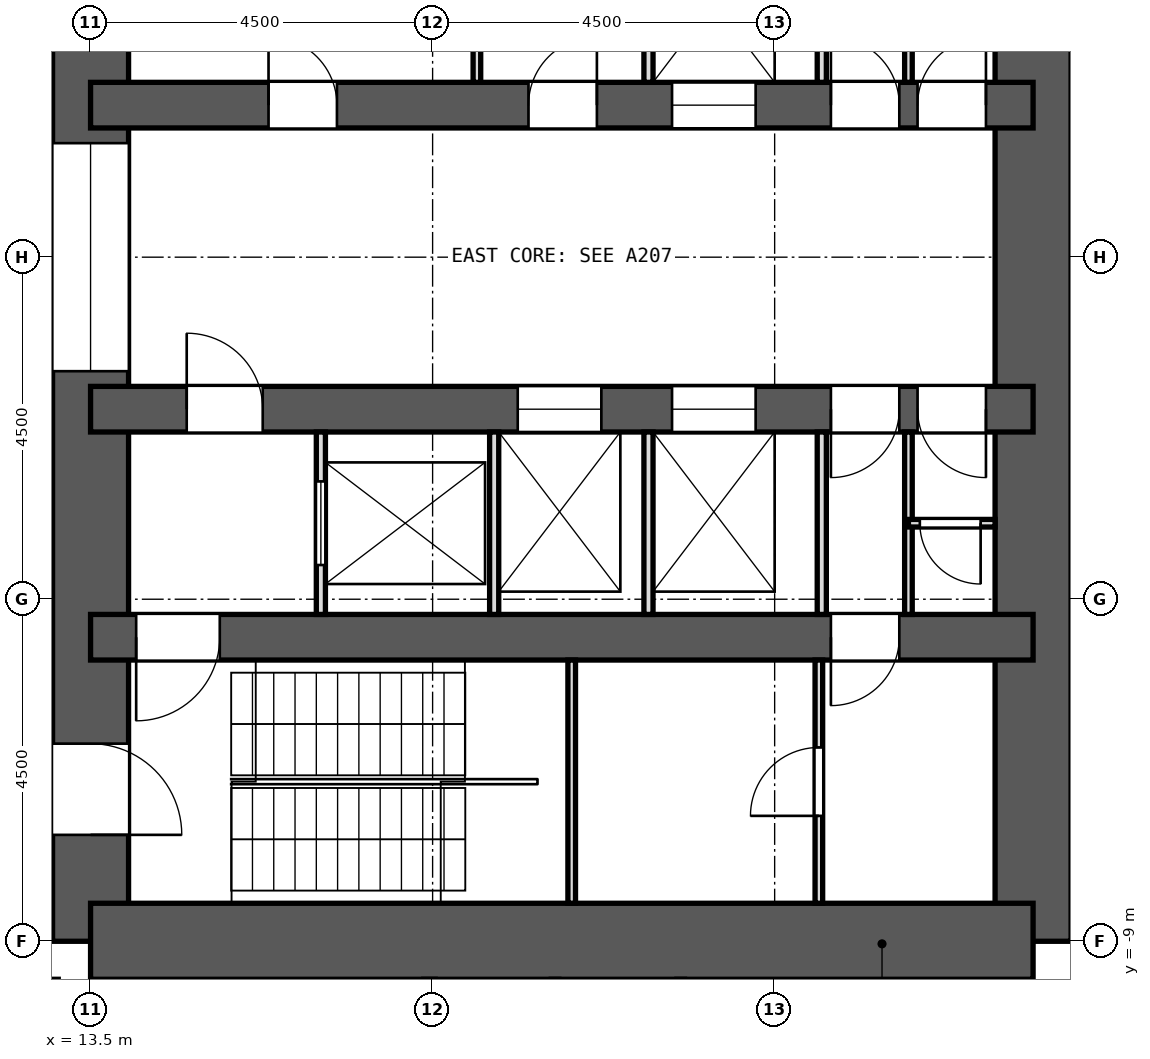
"""IFC4 building model, lengths in metres.
Left out: names, types, materials, properties, quantities, classifications, styles, units other than length and angle.
Written with IfcOpenShell. Run it as: python <this file> out.ifc"""

import sys

from ifc_helpers import new_model, si_unit, direction, frame, frame_2d, origin, place, context, subcontext, project, spatial, rectangle, extrude, element, fill, save


model = new_model("IFC4")
c1 = context("Model", 3, precision=1e-05, world=origin(), true_north=direction((0.0, 1.0)))
c2 = subcontext(c1, "Body", "Model", "MODEL_VIEW")
j1 = project(units=[si_unit("LENGTHUNIT", "METRE"), si_unit("PLANEANGLEUNIT", "RADIAN")], contexts=[c1])
p1 = place(None, origin())
s1 = spatial("IfcSite", under=j1, at=p1, CompositionType="ELEMENT")
p2 = place(p1, origin())
s2 = spatial("IfcBuilding", under=s1, at=p2, CompositionType="ELEMENT")
p3 = place(p2, frame((0.0, 0.0, 17.6)))
s3 = spatial("IfcBuildingStorey", under=s2, at=p3, CompositionType="ELEMENT", Elevation=17.6)
p4 = place(p3, frame((13.5, -9.0, 0.0), z_axis=(0.0, 0.0, 1.0), x_axis=(0.0, 1.0, 0.0)))
e1 = element("IfcWall", 1, at=p4, inside=s3, PredefinedType="SHEAR", context=c2, shape_type="SweptSolid", body=[
    extrude(rectangle(XDim=18.0, YDim=1.0, at=frame_2d((9.0, 0.0))), origin(), (0.0, 0.0, 1.0), 4.2),
])
p5 = place(p4, frame((15.4, 0.0, 0.0)))
e2 = element("IfcOpeningElement", 2, at=p5, cuts=e1, PredefinedType="OPENING", context=c2, shape_type="SweptSolid", body=[
    extrude(rectangle(XDim=1.2, YDim=2.1, at=frame_2d((0.6, 1.05))), frame((0.0, 0.512, 0.0), z_axis=(0.0, -1.0, 0.0), x_axis=(1.0, 0.0, 0.0)), (0.0, 0.0, 1.0), 1.024),
])
p6 = place(p4, frame((1.4, 0.0, 0.0)))
e3 = element("IfcOpeningElement", 3, at=p6, cuts=e1, PredefinedType="OPENING", context=c2, shape_type="SweptSolid", body=[
    extrude(rectangle(XDim=1.2, YDim=2.1, at=frame_2d((0.6, 1.05))), frame((0.0, 0.512, 0.0), z_axis=(0.0, -1.0, 0.0), x_axis=(1.0, 0.0, 0.0)), (0.0, 0.0, 1.0), 1.024),
])
p7 = place(p4, frame((7.5, 0.0, 0.0)))
e4 = element("IfcOpeningElement", 4, at=p7, cuts=e1, PredefinedType="OPENING", context=c2, shape_type="SweptSolid", body=[
    extrude(rectangle(XDim=3.0, YDim=2.4, at=frame_2d((1.5, 1.2))), frame((0.0, 0.512, 0.0), z_axis=(0.0, -1.0, 0.0), x_axis=(1.0, 0.0, 0.0)), (0.0, 0.0, 1.0), 1.024),
])
p8 = place(p3, frame((25.9, -9.0, 0.0), z_axis=(0.0, 0.0, 1.0), x_axis=(0.0, 1.0, 0.0)))
e5 = element("IfcWall", 5, at=p8, inside=s3, PredefinedType="SHEAR", context=c2, shape_type="SweptSolid", body=[
    extrude(rectangle(XDim=18.0, YDim=1.0, at=frame_2d((9.0, 0.0))), origin(), (0.0, 0.0, 1.0), 4.2),
])
p9 = place(p3, frame((13.5, -9.0, 0.0), z_axis=(0.0, 0.0, 1.0), x_axis=(1.0, 0.0, 0.0)))
e6 = element("IfcWall", 6, at=p9, inside=s3, PredefinedType="SHEAR", context=c2, shape_type="SweptSolid", body=[
    extrude(rectangle(XDim=12.4, YDim=1.0, at=frame_2d((6.2, 0.0))), origin(), (0.0, 0.0, 1.0), 4.2),
])
p10 = place(p3, frame((13.5, -5.0, 0.0), z_axis=(0.0, 0.0, 1.0), x_axis=(1.0, 0.0, 0.0)))
e7 = element("IfcWall", 7, at=p10, inside=s3, PredefinedType="SHEAR", context=c2, shape_type="SweptSolid", body=[
    extrude(rectangle(XDim=12.4, YDim=0.6, at=frame_2d((6.2, 0.0))), origin(), (0.0, 0.0, 1.0), 4.2),
])
p11 = place(p10, frame((9.74, 0.0, 0.0)))
e8 = element("IfcOpeningElement", 8, at=p11, cuts=e7, PredefinedType="OPENING", context=c2, shape_type="SweptSolid", body=[
    extrude(rectangle(XDim=0.9, YDim=2.1, at=frame_2d((0.45, 1.05))), frame((0.0, 0.312, 0.0), z_axis=(0.0, -1.0, 0.0), x_axis=(1.0, 0.0, 0.0)), (0.0, 0.0, 1.0), 0.624),
])
p12 = place(p10, frame((0.6, 0.0, 0.0)))
e9 = element("IfcOpeningElement", 9, at=p12, cuts=e7, PredefinedType="OPENING", context=c2, shape_type="SweptSolid", body=[
    extrude(rectangle(XDim=1.1, YDim=2.1, at=frame_2d((0.55, 1.05))), frame((0.0, 0.312, 0.0), z_axis=(0.0, -1.0, 0.0), x_axis=(1.0, 0.0, 0.0)), (0.0, 0.0, 1.0), 0.624),
])
p13 = place(p3, frame((13.5, 2.0, 0.0), z_axis=(0.0, 0.0, 1.0), x_axis=(1.0, 0.0, 0.0)))
e10 = element("IfcWall", 10, at=p13, inside=s3, PredefinedType="SHEAR", context=c2, shape_type="SweptSolid", body=[
    extrude(rectangle(XDim=12.4, YDim=0.6, at=frame_2d((6.2, 0.0))), origin(), (0.0, 0.0, 1.0), 4.2),
])
p14 = place(p13, frame((7.65, 0.0, 0.0)))
e11 = element("IfcOpeningElement", 11, at=p14, cuts=e10, PredefinedType="OPENING", context=c2, shape_type="SweptSolid", body=[
    extrude(rectangle(XDim=1.1, YDim=2.1, at=frame_2d((0.55, 1.05))), frame((0.0, 0.312, 0.0), z_axis=(0.0, -1.0, 0.0), x_axis=(1.0, 0.0, 0.0)), (0.0, 0.0, 1.0), 0.624),
])
p15 = place(p13, frame((2.341, 0.0, 0.0)))
e12 = element("IfcOpeningElement", 12, at=p15, cuts=e10, PredefinedType="OPENING", context=c2, shape_type="SweptSolid", body=[
    extrude(rectangle(XDim=0.9, YDim=2.1, at=frame_2d((0.45, 1.05))), frame((0.0, 0.312, 0.0), z_axis=(0.0, -1.0, 0.0), x_axis=(1.0, 0.0, 0.0)), (0.0, 0.0, 1.0), 0.624),
])
p16 = place(p13, frame((5.761, 0.0, 0.0)))
e13 = element("IfcOpeningElement", 13, at=p16, cuts=e10, PredefinedType="OPENING", context=c2, shape_type="SweptSolid", body=[
    extrude(rectangle(XDim=0.9, YDim=2.1, at=frame_2d((0.45, 1.05))), frame((0.0, 0.312, 0.0), z_axis=(0.0, -1.0, 0.0), x_axis=(1.0, 0.0, 0.0)), (0.0, 0.0, 1.0), 0.624),
])
p17 = place(p13, frame((9.74, 0.0, 0.0)))
e14 = element("IfcOpeningElement", 14, at=p17, cuts=e10, PredefinedType="OPENING", context=c2, shape_type="SweptSolid", body=[
    extrude(rectangle(XDim=0.9, YDim=2.1, at=frame_2d((0.45, 1.05))), frame((0.0, 0.312, 0.0), z_axis=(0.0, -1.0, 0.0), x_axis=(1.0, 0.0, 0.0)), (0.0, 0.0, 1.0), 0.624),
])
p18 = place(p13, frame((10.88, 0.0, 0.0)))
e15 = element("IfcOpeningElement", 15, at=p18, cuts=e10, PredefinedType="OPENING", context=c2, shape_type="SweptSolid", body=[
    extrude(rectangle(XDim=0.9, YDim=2.1, at=frame_2d((0.45, 1.05))), frame((0.0, 0.312, 0.0), z_axis=(0.0, -1.0, 0.0), x_axis=(1.0, 0.0, 0.0)), (0.0, 0.0, 1.0), 0.624),
])
p19 = place(p3, frame((13.5, -2.0, 0.0), z_axis=(0.0, 0.0, 1.0), x_axis=(1.0, 0.0, 0.0)))
e16 = element("IfcWall", 16, at=p19, inside=s3, PredefinedType="SHEAR", context=c2, shape_type="SweptSolid", body=[
    extrude(rectangle(XDim=12.4, YDim=0.6, at=frame_2d((6.2, 0.0))), origin(), (0.0, 0.0, 1.0), 4.2),
])
p20 = place(p19, frame((5.62, 0.0, 0.0)))
e17 = element("IfcOpeningElement", 17, at=p20, cuts=e16, PredefinedType="OPENING", context=c2, shape_type="SweptSolid", body=[
    extrude(rectangle(XDim=1.1, YDim=2.1, at=frame_2d((0.55, 1.05))), frame((0.0, 0.312, 0.0), z_axis=(0.0, -1.0, 0.0), x_axis=(1.0, 0.0, 0.0)), (0.0, 0.0, 1.0), 0.624),
])
p21 = place(p19, frame((7.65, 0.0, 0.0)))
e18 = element("IfcOpeningElement", 18, at=p21, cuts=e16, PredefinedType="OPENING", context=c2, shape_type="SweptSolid", body=[
    extrude(rectangle(XDim=1.1, YDim=2.1, at=frame_2d((0.55, 1.05))), frame((0.0, 0.312, 0.0), z_axis=(0.0, -1.0, 0.0), x_axis=(1.0, 0.0, 0.0)), (0.0, 0.0, 1.0), 0.624),
])
p22 = place(p19, frame((1.265, 0.0, 0.0)))
e19 = element("IfcOpeningElement", 19, at=p22, cuts=e16, PredefinedType="OPENING", context=c2, shape_type="SweptSolid", body=[
    extrude(rectangle(XDim=1.0, YDim=2.1, at=frame_2d((0.5, 1.05))), frame((0.0, 0.312, 0.0), z_axis=(0.0, -1.0, 0.0), x_axis=(1.0, 0.0, 0.0)), (0.0, 0.0, 1.0), 0.624),
])
p23 = place(p19, frame((9.74, 0.0, 0.0)))
e20 = element("IfcOpeningElement", 20, at=p23, cuts=e16, PredefinedType="OPENING", context=c2, shape_type="SweptSolid", body=[
    extrude(rectangle(XDim=0.9, YDim=2.1, at=frame_2d((0.45, 1.05))), frame((0.0, 0.312, 0.0), z_axis=(0.0, -1.0, 0.0), x_axis=(1.0, 0.0, 0.0)), (0.0, 0.0, 1.0), 0.624),
])
p24 = place(p19, frame((10.88, 0.0, 0.0)))
e21 = element("IfcOpeningElement", 21, at=p24, cuts=e16, PredefinedType="OPENING", context=c2, shape_type="SweptSolid", body=[
    extrude(rectangle(XDim=0.9, YDim=2.1, at=frame_2d((0.45, 1.05))), frame((0.0, 0.312, 0.0), z_axis=(0.0, -1.0, 0.0), x_axis=(1.0, 0.0, 0.0)), (0.0, 0.0, 1.0), 0.624),
])
p25 = place(p3, frame((26.328, -11.255, 0.0), z_axis=(0.0, 0.0, 1.0), x_axis=(0.342034744565, 0.939687306241, 0.0)))
e22 = element("IfcWall", 22, at=p25, inside=s3, PredefinedType="SOLIDWALL", context=c2, shape_type="SweptSolid", body=[
    extrude(rectangle(XDim=4.099, YDim=0.6, at=frame_2d((2.05, 0.0))), origin(), (0.0, 0.0, 1.0), 3.6),
])
p26 = place(p3, frame((18.583, 2.3, 0.0), z_axis=(0.0, 0.0, 1.0), x_axis=(0.0, 1.0, 0.0)))
e23 = element("IfcWall", 23, at=p26, inside=s3, PredefinedType="PARTITIONING", context=c2, shape_type="SweptSolid", body=[
    extrude(rectangle(XDim=2.4, YDim=0.1, at=frame_2d((1.2, 0.0))), origin(), (0.0, 0.0, 1.0), 3.6),
])
for number, where, z_axis, x_axis in (
    (24, (20.84, 2.3, 0.0), (0.0, 0.0, 1.0), (0.0, 1.0, 0.0)),
    (25, (23.12, 2.3, 0.0), (0.0, 0.0, 1.0), (0.0, 1.0, 0.0)),
):
    element("IfcWall", number, at=place(p3, frame(where, z_axis=z_axis, x_axis=x_axis)), inside=s3, PredefinedType="PARTITIONING", context=c2, shape_type="SweptSolid", body=[
        extrude(rectangle(XDim=2.4, YDim=0.12, at=frame_2d((1.2, 0.0))), origin(), (0.0, 0.0, 1.0), 3.6),
    ])
p27 = place(p3, frame((24.26, 2.3, 0.0), z_axis=(0.0, 0.0, 1.0), x_axis=(0.0, 1.0, 0.0)))
e26 = element("IfcWall", 26, at=p27, inside=s3, PredefinedType="PARTITIONING", context=c2, shape_type="SweptSolid", body=[
    extrude(rectangle(XDim=2.4, YDim=0.1, at=frame_2d((1.2, 0.0))), origin(), (0.0, 0.0, 1.0), 3.6),
])
p28 = place(p3, frame((16.53, -4.7, 0.0), z_axis=(0.0, 0.0, 1.0), x_axis=(0.0, 1.0, 0.0)))
e27 = element("IfcWall", 27, at=p28, inside=s3, PredefinedType="PARTITIONING", context=c2, shape_type="SweptSolid", body=[
    extrude(rectangle(XDim=2.4, YDim=0.12, at=frame_2d((1.2, 0.0))), origin(), (0.0, 0.0, 1.0), 3.6),
])
p29 = place(p28, frame((0.65, 0.0, 0.0)))
e28 = element("IfcOpeningElement", 28, at=p29, cuts=e27, PredefinedType="OPENING", context=c2, shape_type="SweptSolid", body=[
    extrude(rectangle(XDim=1.1, YDim=2.1, at=frame_2d((0.55, 1.05))), frame((0.0, 0.072, 0.0), z_axis=(0.0, -1.0, 0.0), x_axis=(1.0, 0.0, 0.0)), (0.0, 0.0, 1.0), 0.144),
])
for number, where, z_axis, x_axis in (
    (29, (18.81, -4.7, 0.0), (0.0, 0.0, 1.0), (0.0, 1.0, 0.0)),
    (30, (20.84, -4.7, 0.0), (0.0, 0.0, 1.0), (0.0, 1.0, 0.0)),
    (31, (23.12, -4.7, 0.0), (0.0, 0.0, 1.0), (0.0, 1.0, 0.0)),
):
    element("IfcWall", number, at=place(p3, frame(where, z_axis=z_axis, x_axis=x_axis)), inside=s3, PredefinedType="PARTITIONING", context=c2, shape_type="SweptSolid", body=[
        extrude(rectangle(XDim=2.4, YDim=0.12, at=frame_2d((1.2, 0.0))), origin(), (0.0, 0.0, 1.0), 3.6),
    ])
p30 = place(p3, frame((24.26, -4.7, 0.0), z_axis=(0.0, 0.0, 1.0), x_axis=(0.0, 1.0, 0.0)))
e32 = element("IfcWall", 32, at=p30, inside=s3, PredefinedType="PARTITIONING", context=c2, shape_type="SweptSolid", body=[
    extrude(rectangle(XDim=2.4, YDim=0.1, at=frame_2d((1.2, 0.0))), origin(), (0.0, 0.0, 1.0), 3.6),
])
p31 = place(p3, frame((24.26, -3.5, 0.0), z_axis=(0.0, 0.0, 1.0), x_axis=(1.0, 0.0, 0.0)))
e33 = element("IfcWall", 33, at=p31, inside=s3, PredefinedType="PARTITIONING", context=c2, shape_type="SweptSolid", body=[
    extrude(rectangle(XDim=1.14, YDim=0.1, at=frame_2d((0.57, 0.0))), origin(), (0.0, 0.0, 1.0), 3.6),
])
p32 = place(p31, frame((0.15, 0.0, 0.0)))
e34 = element("IfcOpeningElement", 34, at=p32, cuts=e33, PredefinedType="OPENING", context=c2, shape_type="SweptSolid", body=[
    extrude(rectangle(XDim=0.8, YDim=2.1, at=frame_2d((0.4, 1.05))), frame((0.0, 0.062, 0.0), z_axis=(0.0, -1.0, 0.0), x_axis=(1.0, 0.0, 0.0)), (0.0, 0.0, 1.0), 0.124),
])
p33 = place(p3, frame((19.83, -8.5, 0.0), z_axis=(0.0, 0.0, 1.0), x_axis=(0.0, 1.0, 0.0)))
e35 = element("IfcWall", 35, at=p33, inside=s3, PredefinedType="PARTITIONING", context=c2, shape_type="SweptSolid", body=[
    extrude(rectangle(XDim=3.2, YDim=0.1, at=frame_2d((1.6, 0.0))), origin(), (0.0, 0.0, 1.0), 3.6),
])
p34 = place(p3, frame((23.082, -8.5, 0.0), z_axis=(0.0, 0.0, 1.0), x_axis=(0.0, 1.0, 0.0)))
e36 = element("IfcWall", 36, at=p34, inside=s3, PredefinedType="PARTITIONING", context=c2, shape_type="SweptSolid", body=[
    extrude(rectangle(XDim=3.2, YDim=0.1, at=frame_2d((1.6, 0.0))), origin(), (0.0, 0.0, 1.0), 3.6),
])
p35 = place(p34, frame((1.15, 0.0, 0.0)))
e37 = element("IfcOpeningElement", 37, at=p35, cuts=e36, PredefinedType="OPENING", context=c2, shape_type="SweptSolid", body=[
    extrude(rectangle(XDim=0.9, YDim=2.1, at=frame_2d((0.45, 1.05))), frame((0.0, 0.062, 0.0), z_axis=(0.0, -1.0, 0.0), x_axis=(1.0, 0.0, 0.0)), (0.0, 0.0, 1.0), 0.124),
])
p36 = place(p14, origin())
e38 = element("IfcDoor", 38, at=p36, inside=s3, OperationType="DOUBLE_DOOR_SLIDING", PredefinedType="DOOR", context=c2, shape_type="SweptSolid", body=[
    extrude(rectangle(XDim=1.1, YDim=2.1, at=frame_2d((0.55, 1.05))), frame((0.0, 0.025, 0.0), z_axis=(0.0, -1.0, 0.0), x_axis=(1.0, 0.0, 0.0)), (0.0, 0.0, 1.0), 0.05),
])
fill(e11, e38)
p37 = place(p29, origin())
e39 = element("IfcDoor", 39, at=p37, inside=s3, OperationType="DOUBLE_DOOR_SLIDING", PredefinedType="DOOR", context=c2, shape_type="SweptSolid", body=[
    extrude(rectangle(XDim=1.1, YDim=2.1, at=frame_2d((0.55, 1.05))), frame((0.0, 0.025, 0.0), z_axis=(0.0, -1.0, 0.0), x_axis=(1.0, 0.0, 0.0)), (0.0, 0.0, 1.0), 0.05),
])
fill(e28, e39)
p38 = place(p20, origin())
e40 = element("IfcDoor", 40, at=p38, inside=s3, OperationType="DOUBLE_DOOR_SLIDING", PredefinedType="DOOR", context=c2, shape_type="SweptSolid", body=[
    extrude(rectangle(XDim=1.1, YDim=2.1, at=frame_2d((0.55, 1.05))), frame((0.0, 0.025, 0.0), z_axis=(0.0, -1.0, 0.0), x_axis=(1.0, 0.0, 0.0)), (0.0, 0.0, 1.0), 0.05),
])
fill(e17, e40)
p39 = place(p21, origin())
e41 = element("IfcDoor", 41, at=p39, inside=s3, OperationType="DOUBLE_DOOR_SLIDING", PredefinedType="DOOR", context=c2, shape_type="SweptSolid", body=[
    extrude(rectangle(XDim=1.1, YDim=2.1, at=frame_2d((0.55, 1.05))), frame((0.0, 0.025, 0.0), z_axis=(0.0, -1.0, 0.0), x_axis=(1.0, 0.0, 0.0)), (0.0, 0.0, 1.0), 0.05),
])
fill(e18, e41)
p40 = place(p15, origin())
e42 = element("IfcDoor", 42, at=p40, inside=s3, OperationType="SINGLE_SWING_LEFT", PredefinedType="DOOR", context=c2, shape_type="SweptSolid", body=[
    extrude(rectangle(XDim=0.9, YDim=2.1, at=frame_2d((0.45, 1.05))), frame((0.0, 0.025, 0.0), z_axis=(0.0, -1.0, 0.0), x_axis=(1.0, 0.0, 0.0)), (0.0, 0.0, 1.0), 0.05),
])
fill(e12, e42)
p41 = place(p16, origin())
e43 = element("IfcDoor", 43, at=p41, inside=s3, OperationType="SINGLE_SWING_RIGHT", PredefinedType="DOOR", context=c2, shape_type="SweptSolid", body=[
    extrude(rectangle(XDim=0.9, YDim=2.1, at=frame_2d((0.45, 1.05))), frame((0.0, 0.025, 0.0), z_axis=(0.0, -1.0, 0.0), x_axis=(1.0, 0.0, 0.0)), (0.0, 0.0, 1.0), 0.05),
])
fill(e13, e43)
p42 = place(p17, origin())
e44 = element("IfcDoor", 44, at=p42, inside=s3, OperationType="SINGLE_SWING_LEFT", PredefinedType="DOOR", context=c2, shape_type="SweptSolid", body=[
    extrude(rectangle(XDim=0.9, YDim=2.1, at=frame_2d((0.45, 1.05))), frame((0.0, 0.025, 0.0), z_axis=(0.0, -1.0, 0.0), x_axis=(1.0, 0.0, 0.0)), (0.0, 0.0, 1.0), 0.05),
])
fill(e14, e44)
p43 = place(p18, origin())
e45 = element("IfcDoor", 45, at=p43, inside=s3, OperationType="SINGLE_SWING_RIGHT", PredefinedType="DOOR", context=c2, shape_type="SweptSolid", body=[
    extrude(rectangle(XDim=0.9, YDim=2.1, at=frame_2d((0.45, 1.05))), frame((0.0, 0.025, 0.0), z_axis=(0.0, -1.0, 0.0), x_axis=(1.0, 0.0, 0.0)), (0.0, 0.0, 1.0), 0.05),
])
fill(e15, e45)
p44 = place(p22, origin())
e46 = element("IfcDoor", 46, at=p44, inside=s3, OperationType="SINGLE_SWING_LEFT", PredefinedType="DOOR", context=c2, shape_type="SweptSolid", body=[
    extrude(rectangle(XDim=1.0, YDim=2.1, at=frame_2d((0.5, 1.05))), frame((0.0, 0.025, 0.0), z_axis=(0.0, -1.0, 0.0), x_axis=(1.0, 0.0, 0.0)), (0.0, 0.0, 1.0), 0.05),
])
fill(e19, e46)
p45 = place(p23, frame((0.9, 0.0, 0.0), z_axis=(0.0, 0.0, 1.0), x_axis=(-1.0, 0.0, 0.0)))
e47 = element("IfcDoor", 47, at=p45, inside=s3, OperationType="SINGLE_SWING_RIGHT", PredefinedType="DOOR", context=c2, shape_type="SweptSolid", body=[
    extrude(rectangle(XDim=0.9, YDim=2.1, at=frame_2d((0.45, 1.05))), frame((0.0, 0.025, 0.0), z_axis=(0.0, -1.0, 0.0), x_axis=(1.0, 0.0, 0.0)), (0.0, 0.0, 1.0), 0.05),
])
fill(e20, e47)
p46 = place(p24, frame((0.9, 0.0, 0.0), z_axis=(0.0, 0.0, 1.0), x_axis=(-1.0, 0.0, 0.0)))
e48 = element("IfcDoor", 48, at=p46, inside=s3, OperationType="SINGLE_SWING_LEFT", PredefinedType="DOOR", context=c2, shape_type="SweptSolid", body=[
    extrude(rectangle(XDim=0.9, YDim=2.1, at=frame_2d((0.45, 1.05))), frame((0.0, 0.025, 0.0), z_axis=(0.0, -1.0, 0.0), x_axis=(1.0, 0.0, 0.0)), (0.0, 0.0, 1.0), 0.05),
])
fill(e21, e48)
p47 = place(p32, frame((0.8, 0.0, 0.0), z_axis=(0.0, 0.0, 1.0), x_axis=(-1.0, 0.0, 0.0)))
e49 = element("IfcDoor", 49, at=p47, inside=s3, OperationType="SINGLE_SWING_LEFT", PredefinedType="DOOR", context=c2, shape_type="SweptSolid", body=[
    extrude(rectangle(XDim=0.8, YDim=2.1, at=frame_2d((0.4, 1.05))), frame((0.0, 0.025, 0.0), z_axis=(0.0, -1.0, 0.0), x_axis=(1.0, 0.0, 0.0)), (0.0, 0.0, 1.0), 0.05),
])
fill(e34, e49)
p48 = place(p35, origin())
e50 = element("IfcDoor", 50, at=p48, inside=s3, OperationType="SINGLE_SWING_LEFT", PredefinedType="DOOR", context=c2, shape_type="SweptSolid", body=[
    extrude(rectangle(XDim=0.9, YDim=2.1, at=frame_2d((0.45, 1.05))), frame((0.0, 0.025, 0.0), z_axis=(0.0, -1.0, 0.0), x_axis=(1.0, 0.0, 0.0)), (0.0, 0.0, 1.0), 0.05),
])
fill(e37, e50)
p49 = place(p11, frame((0.9, 0.0, 0.0), z_axis=(0.0, 0.0, 1.0), x_axis=(-1.0, 0.0, 0.0)))
e51 = element("IfcDoor", 51, at=p49, inside=s3, OperationType="SINGLE_SWING_RIGHT", PredefinedType="DOOR", context=c2, shape_type="SweptSolid", body=[
    extrude(rectangle(XDim=0.9, YDim=2.1, at=frame_2d((0.45, 1.05))), frame((0.0, 0.025, 0.0), z_axis=(0.0, -1.0, 0.0), x_axis=(1.0, 0.0, 0.0)), (0.0, 0.0, 1.0), 0.05),
])
fill(e8, e51)
p50 = place(p12, frame((1.1, 0.0, 0.0), z_axis=(0.0, 0.0, 1.0), x_axis=(-1.0, 0.0, 0.0)))
e52 = element("IfcDoor", 52, at=p50, inside=s3, OperationType="SINGLE_SWING_RIGHT", PredefinedType="DOOR", context=c2, shape_type="SweptSolid", body=[
    extrude(rectangle(XDim=1.1, YDim=2.1, at=frame_2d((0.55, 1.05))), frame((0.0, 0.025, 0.0), z_axis=(0.0, -1.0, 0.0), x_axis=(1.0, 0.0, 0.0)), (0.0, 0.0, 1.0), 0.05),
])
fill(e9, e52)
p51 = place(p6, frame((1.2, 0.0, 0.0), z_axis=(0.0, 0.0, 1.0), x_axis=(-1.0, 0.0, 0.0)))
e53 = element("IfcDoor", 53, at=p51, inside=s3, OperationType="SINGLE_SWING_RIGHT", PredefinedType="DOOR", context=c2, shape_type="SweptSolid", body=[
    extrude(rectangle(XDim=1.2, YDim=2.1, at=frame_2d((0.6, 1.05))), frame((0.0, 0.025, 0.0), z_axis=(0.0, -1.0, 0.0), x_axis=(1.0, 0.0, 0.0)), (0.0, 0.0, 1.0), 0.05),
])
fill(e3, e53)
p52 = place(p7, origin())
e54 = element("IfcDoor", 54, at=p52, inside=s3, OperationType="DOUBLE_DOOR_SLIDING", PredefinedType="DOOR", context=c2, shape_type="SweptSolid", body=[
    extrude(rectangle(XDim=3.0, YDim=2.4, at=frame_2d((1.5, 1.2))), frame((0.0, 0.025, 0.0), z_axis=(0.0, -1.0, 0.0), x_axis=(1.0, 0.0, 0.0)), (0.0, 0.0, 1.0), 0.05),
])
fill(e4, e54)
save(model, sys.argv[1])
